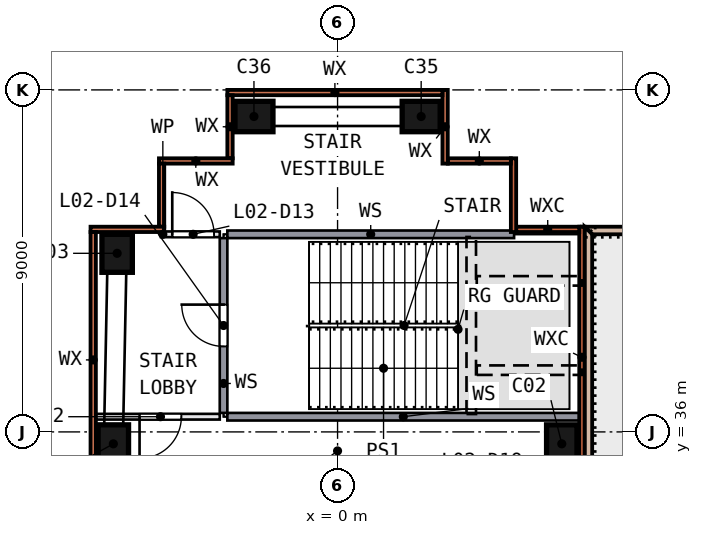
"""IFC4 building model, lengths in metres.
Left out: names, types, materials, properties, quantities, classifications, styles, units other than length and angle.
Written with IfcOpenShell. Run it as: python <this file> out.ifc"""

import sys

from ifc_helpers import new_model, si_unit, direction, frame, frame_2d, origin, origin_2d, place, context, subcontext, project, spatial, polyline, rectangle, outline, extrude, element, fill, save


model = new_model("IFC4")
c1 = context("Model", 3, precision=1e-05, world=origin(), true_north=direction((0.0, 1.0)))
c2 = subcontext(c1, "Body", "Model", "MODEL_VIEW")
j1 = project(units=[si_unit("LENGTHUNIT", "METRE"), si_unit("PLANEANGLEUNIT", "RADIAN")], contexts=[c1])
p1 = place(None, origin())
s1 = spatial("IfcSite", under=j1, at=p1, CompositionType="ELEMENT")
p2 = place(p1, origin())
s2 = spatial("IfcBuilding", under=s1, at=p2, CompositionType="ELEMENT")
p3 = place(p2, frame((0.0, 0.0, 14.0)))
s3 = spatial("IfcBuildingStorey", under=s2, at=p3, CompositionType="ELEMENT", Elevation=14.0)
for number, where, z_axis, x_axis in (
    (1, (5.9, 35.686, 0.0), (0.0, 0.0, 1.0), (0.0, 1.0, 0.0)),
    (2, (-5.8, 40.7, 0.0), (0.0, 0.0, 1.0), (0.0, -1.0, 0.0)),
    (3, (-5.9, 35.686, 0.0), (0.0, 0.0, 1.0), (0.0, -1.0, 0.0)),
    (4, (2.2, 44.3, 0.0), (0.0, 0.0, 1.0), (-1.0, 0.0, 0.0)),
    (5, (-2.2, 44.3, 0.0), (0.0, 0.0, 1.0), (-1.0, 0.0, 0.0)),
):
    element("IfcColumn", number, at=place(p3, frame(where, z_axis=z_axis, x_axis=x_axis)), inside=s3, PredefinedType="COLUMN", context=c2, shape_type="SweptSolid", body=[
        extrude(rectangle(XDim=1.0, YDim=0.8, at=origin_2d()), origin(), (0.0, 0.0, 1.0), 4.55),
    ])
p4 = place(p3, frame((6.43, 23.995, 0.0), z_axis=(0.0, 0.0, 1.0), x_axis=(0.0, 1.0, 0.0)))
e6 = element("IfcWall", 6, at=p4, inside=s3, PredefinedType="SOLIDWALL", context=c2, shape_type="SweptSolid", body=[
    extrude(rectangle(XDim=17.405, YDim=0.14, at=frame_2d((8.702, 0.0))), origin(), (0.0, 0.0, 1.0), 4.55),
])
p5 = place(p4, frame((2.234, 0.0, 0.0)))
e7 = element("IfcOpeningElement", 7, at=p5, cuts=e6, PredefinedType="OPENING", context=c2, shape_type="SweptSolid", body=[
    extrude(rectangle(XDim=1.8, YDim=2.4, at=frame_2d((0.9, 1.2))), frame((0.0, 0.08, 0.0), z_axis=(0.0, -1.0, 0.0), x_axis=(1.0, 0.0, 0.0)), (0.0, 0.0, 1.0), 0.16),
])
p6 = place(p4, frame((7.334, 0.0, 0.9)))
e8 = element("IfcOpeningElement", 8, at=p6, cuts=e6, PredefinedType="OPENING", context=c2, shape_type="SweptSolid", body=[
    extrude(rectangle(XDim=3.0, YDim=2.7, at=frame_2d((1.5, 1.35))), frame((0.0, 0.08, 0.0), z_axis=(0.0, -1.0, 0.0), x_axis=(1.0, 0.0, 0.0)), (0.0, 0.0, 1.0), 0.16),
])
p7 = place(p3, frame((6.36, 41.33, 0.0), z_axis=(0.0, 0.0, 1.0), x_axis=(-1.0, 0.0, 0.0)))
e9 = element("IfcWall", 9, at=p7, inside=s3, PredefinedType="SOLIDWALL", context=c2, shape_type="SweptSolid", body=[
    extrude(rectangle(XDim=1.66, YDim=0.14, at=frame_2d((0.83, 0.0))), origin(), (0.0, 0.0, 1.0), 4.55),
])
p8 = place(p3, frame((4.63, 41.26, 0.0), z_axis=(0.0, 0.0, 1.0), x_axis=(0.0, 1.0, 0.0)))
e10 = element("IfcWall", 10, at=p8, inside=s3, PredefinedType="SOLIDWALL", context=c2, shape_type="SweptSolid", body=[
    extrude(rectangle(XDim=1.94, YDim=0.14, at=frame_2d((0.97, 0.0))), origin(), (0.0, 0.0, 1.0), 4.55),
])
p9 = place(p3, frame((4.56, 43.13, 0.0), z_axis=(0.0, 0.0, 1.0), x_axis=(-1.0, 0.0, 0.0)))
e11 = element("IfcWall", 11, at=p9, inside=s3, PredefinedType="SOLIDWALL", context=c2, shape_type="SweptSolid", body=[
    extrude(rectangle(XDim=1.66, YDim=0.14, at=frame_2d((0.83, 0.0))), origin(), (0.0, 0.0, 1.0), 4.55),
])
p10 = place(p3, frame((2.83, 43.06, 0.0), z_axis=(0.0, 0.0, 1.0), x_axis=(0.0, 1.0, 0.0)))
e12 = element("IfcWall", 12, at=p10, inside=s3, PredefinedType="SOLIDWALL", context=c2, shape_type="SweptSolid", body=[
    extrude(rectangle(XDim=1.94, YDim=0.14, at=frame_2d((0.97, 0.0))), origin(), (0.0, 0.0, 1.0), 4.55),
])
p11 = place(p3, frame((2.76, 44.93, 0.0), z_axis=(0.0, 0.0, 1.0), x_axis=(-1.0, 0.0, 0.0)))
e13 = element("IfcWall", 13, at=p11, inside=s3, PredefinedType="SOLIDWALL", context=c2, shape_type="SweptSolid", body=[
    extrude(rectangle(XDim=5.66, YDim=0.14, at=frame_2d((2.83, 0.0))), origin(), (0.0, 0.0, 1.0), 4.55),
])
p12 = place(p3, frame((-2.83, 44.86, 0.0), z_axis=(0.0, 0.0, 1.0), x_axis=(0.0, -1.0, 0.0)))
e14 = element("IfcWall", 14, at=p12, inside=s3, PredefinedType="SOLIDWALL", context=c2, shape_type="SweptSolid", body=[
    extrude(rectangle(XDim=1.66, YDim=0.14, at=frame_2d((0.83, 0.0))), origin(), (0.0, 0.0, 1.0), 4.55),
])
p13 = place(p3, frame((-2.76, 43.13, 0.0), z_axis=(0.0, 0.0, 1.0), x_axis=(-1.0, 0.0, 0.0)))
e15 = element("IfcWall", 15, at=p13, inside=s3, PredefinedType="SOLIDWALL", context=c2, shape_type="SweptSolid", body=[
    extrude(rectangle(XDim=1.94, YDim=0.14, at=frame_2d((0.97, 0.0))), origin(), (0.0, 0.0, 1.0), 4.55),
])
p14 = place(p3, frame((-4.63, 43.06, 0.0), z_axis=(0.0, 0.0, 1.0), x_axis=(0.0, -1.0, 0.0)))
e16 = element("IfcWall", 16, at=p14, inside=s3, PredefinedType="SOLIDWALL", context=c2, shape_type="SweptSolid", body=[
    extrude(rectangle(XDim=1.66, YDim=0.14, at=frame_2d((0.83, 0.0))), origin(), (0.0, 0.0, 1.0), 4.55),
])
p15 = place(p3, frame((-4.56, 41.33, 0.0), z_axis=(0.0, 0.0, 1.0), x_axis=(-1.0, 0.0, 0.0)))
e17 = element("IfcWall", 17, at=p15, inside=s3, PredefinedType="SOLIDWALL", context=c2, shape_type="SweptSolid", body=[
    extrude(rectangle(XDim=1.94, YDim=0.14, at=frame_2d((0.97, 0.0))), origin(), (0.0, 0.0, 1.0), 4.55),
])
p16 = place(p3, frame((-6.43, 41.26, 0.0), z_axis=(0.0, 0.0, 1.0), x_axis=(0.0, -1.0, 0.0)))
e18 = element("IfcWall", 18, at=p16, inside=s3, PredefinedType="SOLIDWALL", context=c2, shape_type="SweptSolid", body=[
    extrude(rectangle(XDim=16.961, YDim=0.14, at=frame_2d((8.481, 0.0))), origin(), (0.0, 0.0, 1.0), 4.55),
])
p17 = place(p16, frame((6.931, 0.0, 0.9)))
e19 = element("IfcOpeningElement", 19, at=p17, cuts=e18, PredefinedType="OPENING", context=c2, shape_type="SweptSolid", body=[
    extrude(rectangle(XDim=3.0, YDim=2.7, at=frame_2d((1.5, 1.35))), frame((0.0, 0.08, 0.0), z_axis=(0.0, -1.0, 0.0), x_axis=(1.0, 0.0, 0.0)), (0.0, 0.0, 1.0), 0.16),
])
p18 = place(p16, frame((12.631, 0.0, 0.9)))
e20 = element("IfcOpeningElement", 20, at=p18, cuts=e18, PredefinedType="OPENING", context=c2, shape_type="SweptSolid", body=[
    extrude(rectangle(XDim=3.0, YDim=2.7, at=frame_2d((1.5, 1.35))), frame((0.0, 0.08, 0.0), z_axis=(0.0, -1.0, 0.0), x_axis=(1.0, 0.0, 0.0)), (0.0, 0.0, 1.0), 0.16),
])
p19 = place(p3, origin())
e21 = element("IfcWall", 21, at=p19, inside=s3, PredefinedType="SOLIDWALL", context=c2, shape_type="SweptSolid", body=[
    extrude(outline(polyline([(21.937, 41.2), (22.0, 41.4), (6.5, 41.4), (6.7, 41.2), (21.937, 41.2)])), origin(), (0.0, 0.0, 1.0), 0.45),
])
p20 = place(p3, origin())
e22 = element("IfcWall", 22, at=p20, inside=s3, PredefinedType="SOLIDWALL", context=c2, shape_type="SweptSolid", body=[
    extrude(outline(polyline([(6.5, 41.4), (6.5, 28.179), (6.7, 28.179), (6.7, 41.2), (6.5, 41.4)])), origin(), (0.0, 0.0, 1.0), 0.45),
])
p21 = place(p3, frame((-3.1, 36.4, 0.0), z_axis=(0.0, 0.0, 1.0), x_axis=(-1.0, 0.0, 0.0)))
e23 = element("IfcWall", 23, at=p21, inside=s3, PredefinedType="PARTITIONING", context=c2, shape_type="SweptSolid", body=[
    extrude(rectangle(XDim=3.26, YDim=0.15, at=frame_2d((1.63, 0.0))), origin(), (0.0, 0.0, 1.0), 4.55),
])
p22 = place(p21, frame((1.01, 0.0, 0.0)))
e24 = element("IfcOpeningElement", 24, at=p22, cuts=e23, PredefinedType="OPENING", context=c2, shape_type="SweptSolid", body=[
    extrude(rectangle(XDim=1.1, YDim=2.1, at=frame_2d((0.55, 1.05))), frame((0.0, 0.085, 0.0), z_axis=(0.0, -1.0, 0.0), x_axis=(1.0, 0.0, 0.0)), (0.0, 0.0, 1.0), 0.17),
])
p23 = place(p3, frame((-2.9, 36.4, 0.0), z_axis=(0.0, 0.0, 1.0), x_axis=(1.0, 0.0, 0.0)))
e25 = element("IfcWall", 25, at=p23, inside=s3, PredefinedType="SOLIDWALL", context=c2, shape_type="SweptSolid", body=[
    extrude(rectangle(XDim=9.26, YDim=0.2, at=frame_2d((4.63, 0.0))), origin(), (0.0, 0.0, 1.0), 4.55),
])
p24 = place(p3, frame((-4.645, 41.2, 0.0), z_axis=(0.0, 0.0, 1.0), x_axis=(1.0, 0.0, 0.0)))
e26 = element("IfcWall", 26, at=p24, inside=s3, PredefinedType="PARTITIONING", context=c2, shape_type="SweptSolid", body=[
    extrude(rectangle(XDim=1.545, YDim=0.15, at=frame_2d((0.772, 0.0))), origin(), (0.0, 0.0, 1.0), 4.55),
])
p25 = place(p24, frame((0.295, 0.0, 0.0)))
e27 = element("IfcOpeningElement", 27, at=p25, cuts=e26, PredefinedType="OPENING", context=c2, shape_type="SweptSolid", body=[
    extrude(rectangle(XDim=1.1, YDim=2.1, at=frame_2d((0.55, 1.05))), frame((0.0, 0.085, 0.0), z_axis=(0.0, -1.0, 0.0), x_axis=(1.0, 0.0, 0.0)), (0.0, 0.0, 1.0), 0.17),
])
p26 = place(p3, frame((-3.0, 36.5, 0.0), z_axis=(0.0, 0.0, 1.0), x_axis=(0.0, 1.0, 0.0)))
e28 = element("IfcWall", 28, at=p26, inside=s3, PredefinedType="SOLIDWALL", context=c2, shape_type="SweptSolid", body=[
    extrude(rectangle(XDim=4.6, YDim=0.2, at=frame_2d((2.3, 0.0))), origin(), (0.0, 0.0, 1.0), 4.55),
])
p27 = place(p26, frame((1.75, 0.0, 0.0)))
e29 = element("IfcOpeningElement", 29, at=p27, cuts=e28, PredefinedType="OPENING", context=c2, shape_type="SweptSolid", body=[
    extrude(rectangle(XDim=1.1, YDim=2.1, at=frame_2d((0.55, 1.05))), frame((0.0, 0.11, 0.0), z_axis=(0.0, -1.0, 0.0), x_axis=(1.0, 0.0, 0.0)), (0.0, 0.0, 1.0), 0.22),
])
p28 = place(p3, frame((4.645, 41.2, 0.0), z_axis=(0.0, 0.0, 1.0), x_axis=(-1.0, 0.0, 0.0)))
e30 = element("IfcWall", 30, at=p28, inside=s3, PredefinedType="SOLIDWALL", context=c2, shape_type="SweptSolid", body=[
    extrude(rectangle(XDim=7.545, YDim=0.2, at=frame_2d((3.772, 0.0))), origin(), (0.0, 0.0, 1.0), 4.55),
])
p29 = place(p22, origin())
e31 = element("IfcDoor", 31, at=p29, inside=s3, OperationType="SINGLE_SWING_RIGHT", PredefinedType="DOOR", context=c2, shape_type="SweptSolid", body=[
    extrude(rectangle(XDim=1.1, YDim=2.1, at=frame_2d((0.55, 1.05))), frame((0.0, 0.025, 0.0), z_axis=(0.0, -1.0, 0.0), x_axis=(1.0, 0.0, 0.0)), (0.0, 0.0, 1.0), 0.05),
])
fill(e24, e31)
p30 = place(p25, origin())
e32 = element("IfcDoor", 32, at=p30, inside=s3, OperationType="SINGLE_SWING_LEFT", PredefinedType="DOOR", context=c2, shape_type="SweptSolid", body=[
    extrude(rectangle(XDim=1.1, YDim=2.1, at=frame_2d((0.55, 1.05))), frame((0.0, 0.025, 0.0), z_axis=(0.0, -1.0, 0.0), x_axis=(1.0, 0.0, 0.0)), (0.0, 0.0, 1.0), 0.05),
])
fill(e27, e32)
p31 = place(p27, origin())
e33 = element("IfcDoor", 33, at=p31, inside=s3, OperationType="SINGLE_SWING_RIGHT", PredefinedType="DOOR", context=c2, shape_type="SweptSolid", body=[
    extrude(rectangle(XDim=1.1, YDim=2.1, at=frame_2d((0.55, 1.05))), frame((0.0, 0.025, 0.0), z_axis=(0.0, -1.0, 0.0), x_axis=(1.0, 0.0, 0.0)), (0.0, 0.0, 1.0), 0.05),
])
fill(e29, e33)
save(model, sys.argv[1])
